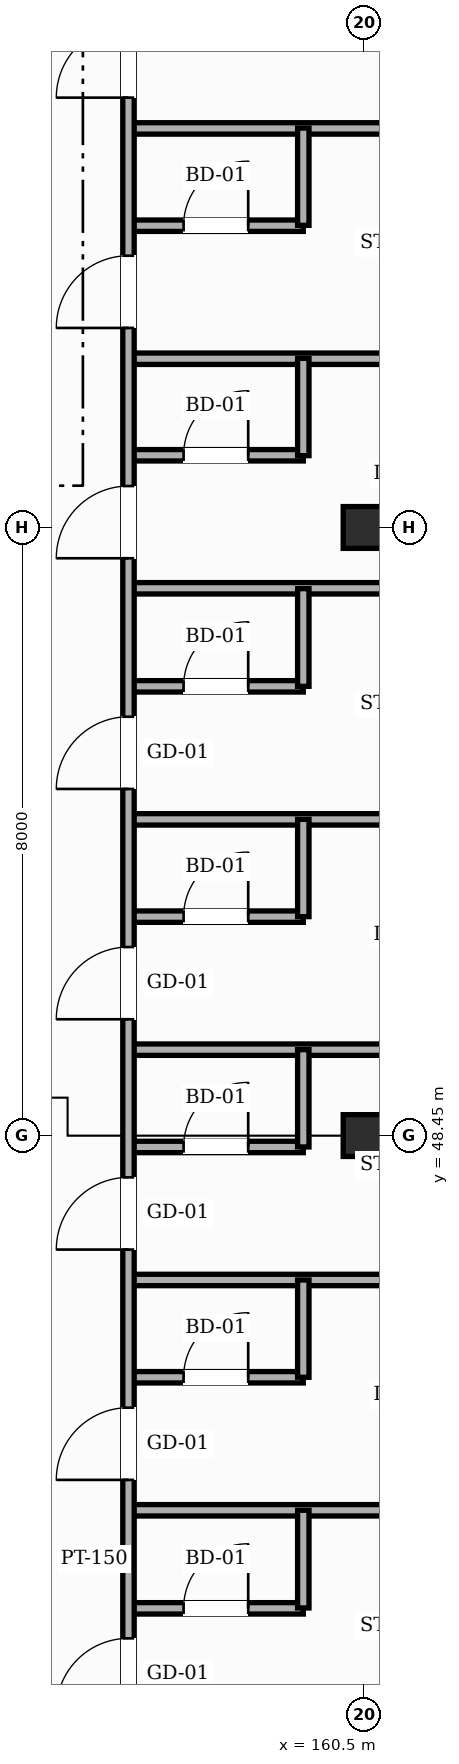
"""IFC4 building model, lengths in metres.
Left out: names, types, materials, properties, quantities, classifications, styles, units other than length and angle.
Written with IfcOpenShell. Run it as: python <this file> out.ifc"""

import sys

from ifc_helpers import new_model, si_unit, direction, frame, frame_2d, origin, origin_2d, place, context, subcontext, project, spatial, rectangle, hollow_rectangle, extrude, element, fill, save


model = new_model("IFC4")
c1 = context("Model", 3, precision=1e-05, world=origin(), true_north=direction((0.0, 1.0)))
c2 = subcontext(c1, "Body", "Model", "MODEL_VIEW")
j1 = project(units=[si_unit("LENGTHUNIT", "METRE"), si_unit("PLANEANGLEUNIT", "RADIAN")], contexts=[c1])
p1 = place(None, origin())
s1 = spatial("IfcSite", under=j1, at=p1, CompositionType="ELEMENT")
p2 = place(p1, origin())
s2 = spatial("IfcBuilding", under=s1, at=p2, CompositionType="ELEMENT")
p3 = place(p2, frame((0.0, 0.0, 24.6)))
s3 = spatial("IfcBuildingStorey", under=s2, at=p3, CompositionType="ELEMENT", Elevation=24.6)
for number, where, z_axis, x_axis in (
    (1, (160.5, 48.45, 0.0), (0.0, 0.0, 1.0), (1.0, 0.0, 0.0)),
    (2, (160.5, 56.45, 0.0), (0.0, 0.0, 1.0), (1.0, 0.0, 0.0)),
):
    element("IfcColumn", number, at=place(p3, frame(where, z_axis=z_axis, x_axis=x_axis)), inside=s3, PredefinedType="COLUMN", context=c2, shape_type="SweptSolid", body=[
        extrude(hollow_rectangle(XDim=0.55, YDim=0.55, WallThickness=0.022, InnerFilletRadius=0.022, OuterFilletRadius=0.044, at=origin_2d()), origin(), (0.0, 0.0, 1.0), 3.6),
    ])
p4 = place(p3, frame((157.4, 42.23, 0.0), z_axis=(0.0, 0.0, 1.0), x_axis=(1.0, 0.0, 0.0)))
e3 = element("IfcWall", 3, at=p4, inside=s3, PredefinedType="PARTITIONING", context=c2, shape_type="SweptSolid", body=[
    extrude(rectangle(XDim=2.3, YDim=0.15, at=frame_2d((1.15, 0.0))), origin(), (0.0, 0.0, 1.0), 3.365),
])
p5 = place(p4, frame((0.725, 0.0, 0.0)))
e4 = element("IfcOpeningElement", 4, at=p5, cuts=e3, PredefinedType="OPENING", context=c2, shape_type="SweptSolid", body=[
    extrude(rectangle(XDim=0.85, YDim=2.1, at=frame_2d((0.425, 1.05))), frame((0.0, 0.085, 0.0), z_axis=(0.0, -1.0, 0.0), x_axis=(1.0, 0.0, 0.0)), (0.0, 0.0, 1.0), 0.17),
])
p6 = place(p3, frame((157.4, 43.52, 0.0), z_axis=(0.0, 0.0, 1.0), x_axis=(1.0, 0.0, 0.0)))
e5 = element("IfcWall", 5, at=p6, inside=s3, PredefinedType="PARTITIONING", context=c2, shape_type="SweptSolid", body=[
    extrude(rectangle(XDim=9.8, YDim=0.15, at=frame_2d((4.9, 0.0))), origin(), (0.0, 0.0, 1.0), 3.365),
])
p7 = place(p3, frame((157.4, 45.27, 0.0), z_axis=(0.0, 0.0, 1.0), x_axis=(1.0, 0.0, 0.0)))
e6 = element("IfcWall", 6, at=p7, inside=s3, PredefinedType="PARTITIONING", context=c2, shape_type="SweptSolid", body=[
    extrude(rectangle(XDim=2.3, YDim=0.15, at=frame_2d((1.15, 0.0))), origin(), (0.0, 0.0, 1.0), 3.365),
])
p8 = place(p7, frame((0.725, 0.0, 0.0)))
e7 = element("IfcOpeningElement", 7, at=p8, cuts=e6, PredefinedType="OPENING", context=c2, shape_type="SweptSolid", body=[
    extrude(rectangle(XDim=0.85, YDim=2.1, at=frame_2d((0.425, 1.05))), frame((0.0, 0.085, 0.0), z_axis=(0.0, -1.0, 0.0), x_axis=(1.0, 0.0, 0.0)), (0.0, 0.0, 1.0), 0.17),
])
p9 = place(p3, frame((157.4, 46.55, 0.0), z_axis=(0.0, 0.0, 1.0), x_axis=(1.0, 0.0, 0.0)))
e8 = element("IfcWall", 8, at=p9, inside=s3, PredefinedType="PARTITIONING", context=c2, shape_type="SweptSolid", body=[
    extrude(rectangle(XDim=9.8, YDim=0.15, at=frame_2d((4.9, 0.0))), origin(), (0.0, 0.0, 1.0), 3.365),
])
p10 = place(p3, frame((157.4, 48.3, 0.0), z_axis=(0.0, 0.0, 1.0), x_axis=(1.0, 0.0, 0.0)))
e9 = element("IfcWall", 9, at=p10, inside=s3, PredefinedType="PARTITIONING", context=c2, shape_type="SweptSolid", body=[
    extrude(rectangle(XDim=2.3, YDim=0.15, at=frame_2d((1.15, 0.0))), origin(), (0.0, 0.0, 1.0), 3.365),
])
p11 = place(p10, frame((0.725, 0.0, 0.0)))
e10 = element("IfcOpeningElement", 10, at=p11, cuts=e9, PredefinedType="OPENING", context=c2, shape_type="SweptSolid", body=[
    extrude(rectangle(XDim=0.85, YDim=2.1, at=frame_2d((0.425, 1.05))), frame((0.0, 0.085, 0.0), z_axis=(0.0, -1.0, 0.0), x_axis=(1.0, 0.0, 0.0)), (0.0, 0.0, 1.0), 0.17),
])
p12 = place(p3, frame((157.4, 49.58, 0.0), z_axis=(0.0, 0.0, 1.0), x_axis=(1.0, 0.0, 0.0)))
e11 = element("IfcWall", 11, at=p12, inside=s3, PredefinedType="PARTITIONING", context=c2, shape_type="SweptSolid", body=[
    extrude(rectangle(XDim=9.8, YDim=0.15, at=frame_2d((4.9, 0.0))), origin(), (0.0, 0.0, 1.0), 3.365),
])
p13 = place(p3, frame((157.4, 51.33, 0.0), z_axis=(0.0, 0.0, 1.0), x_axis=(1.0, 0.0, 0.0)))
e12 = element("IfcWall", 12, at=p13, inside=s3, PredefinedType="PARTITIONING", context=c2, shape_type="SweptSolid", body=[
    extrude(rectangle(XDim=2.3, YDim=0.15, at=frame_2d((1.15, 0.0))), origin(), (0.0, 0.0, 1.0), 3.365),
])
p14 = place(p13, frame((0.725, 0.0, 0.0)))
e13 = element("IfcOpeningElement", 13, at=p14, cuts=e12, PredefinedType="OPENING", context=c2, shape_type="SweptSolid", body=[
    extrude(rectangle(XDim=0.85, YDim=2.1, at=frame_2d((0.425, 1.05))), frame((0.0, 0.085, 0.0), z_axis=(0.0, -1.0, 0.0), x_axis=(1.0, 0.0, 0.0)), (0.0, 0.0, 1.0), 0.17),
])
p15 = place(p3, frame((157.4, 52.61, 0.0), z_axis=(0.0, 0.0, 1.0), x_axis=(1.0, 0.0, 0.0)))
e14 = element("IfcWall", 14, at=p15, inside=s3, PredefinedType="PARTITIONING", context=c2, shape_type="SweptSolid", body=[
    extrude(rectangle(XDim=9.8, YDim=0.15, at=frame_2d((4.9, 0.0))), origin(), (0.0, 0.0, 1.0), 3.055),
])
p16 = place(p3, frame((157.4, 54.36, 0.0), z_axis=(0.0, 0.0, 1.0), x_axis=(1.0, 0.0, 0.0)))
e15 = element("IfcWall", 15, at=p16, inside=s3, PredefinedType="PARTITIONING", context=c2, shape_type="SweptSolid", body=[
    extrude(rectangle(XDim=2.3, YDim=0.15, at=frame_2d((1.15, 0.0))), origin(), (0.0, 0.0, 1.0), 3.365),
])
p17 = place(p16, frame((0.725, 0.0, 0.0)))
e16 = element("IfcOpeningElement", 16, at=p17, cuts=e15, PredefinedType="OPENING", context=c2, shape_type="SweptSolid", body=[
    extrude(rectangle(XDim=0.85, YDim=2.1, at=frame_2d((0.425, 1.05))), frame((0.0, 0.085, 0.0), z_axis=(0.0, -1.0, 0.0), x_axis=(1.0, 0.0, 0.0)), (0.0, 0.0, 1.0), 0.17),
])
p18 = place(p3, frame((157.4, 55.65, 0.0), z_axis=(0.0, 0.0, 1.0), x_axis=(1.0, 0.0, 0.0)))
e17 = element("IfcWall", 17, at=p18, inside=s3, PredefinedType="PARTITIONING", context=c2, shape_type="SweptSolid", body=[
    extrude(rectangle(XDim=9.8, YDim=0.15, at=frame_2d((4.9, 0.0))), origin(), (0.0, 0.0, 1.0), 3.365),
])
p19 = place(p3, frame((157.4, 57.4, 0.0), z_axis=(0.0, 0.0, 1.0), x_axis=(1.0, 0.0, 0.0)))
e18 = element("IfcWall", 18, at=p19, inside=s3, PredefinedType="PARTITIONING", context=c2, shape_type="SweptSolid", body=[
    extrude(rectangle(XDim=2.3, YDim=0.15, at=frame_2d((1.15, 0.0))), origin(), (0.0, 0.0, 1.0), 3.365),
])
p20 = place(p19, frame((0.725, 0.0, 0.0)))
e19 = element("IfcOpeningElement", 19, at=p20, cuts=e18, PredefinedType="OPENING", context=c2, shape_type="SweptSolid", body=[
    extrude(rectangle(XDim=0.85, YDim=2.1, at=frame_2d((0.425, 1.05))), frame((0.0, 0.085, 0.0), z_axis=(0.0, -1.0, 0.0), x_axis=(1.0, 0.0, 0.0)), (0.0, 0.0, 1.0), 0.17),
])
p21 = place(p3, frame((157.4, 58.67, 0.0), z_axis=(0.0, 0.0, 1.0), x_axis=(1.0, 0.0, 0.0)))
e20 = element("IfcWall", 20, at=p21, inside=s3, PredefinedType="PARTITIONING", context=c2, shape_type="SweptSolid", body=[
    extrude(rectangle(XDim=9.8, YDim=0.15, at=frame_2d((4.9, 0.0))), origin(), (0.0, 0.0, 1.0), 3.365),
])
p22 = place(p3, frame((157.4, 60.42, 0.0), z_axis=(0.0, 0.0, 1.0), x_axis=(1.0, 0.0, 0.0)))
e21 = element("IfcWall", 21, at=p22, inside=s3, PredefinedType="PARTITIONING", context=c2, shape_type="SweptSolid", body=[
    extrude(rectangle(XDim=2.3, YDim=0.15, at=frame_2d((1.15, 0.0))), origin(), (0.0, 0.0, 1.0), 3.365),
])
p23 = place(p22, frame((0.725, 0.0, 0.0)))
e22 = element("IfcOpeningElement", 22, at=p23, cuts=e21, PredefinedType="OPENING", context=c2, shape_type="SweptSolid", body=[
    extrude(rectangle(XDim=0.85, YDim=2.1, at=frame_2d((0.425, 1.05))), frame((0.0, 0.085, 0.0), z_axis=(0.0, -1.0, 0.0), x_axis=(1.0, 0.0, 0.0)), (0.0, 0.0, 1.0), 0.17),
])
p24 = place(p3, frame((157.4, 61.7, 0.0), z_axis=(0.0, 0.0, 1.0), x_axis=(1.0, 0.0, 0.0)))
e23 = element("IfcWall", 23, at=p24, inside=s3, PredefinedType="PARTITIONING", context=c2, shape_type="SweptSolid", body=[
    extrude(rectangle(XDim=9.8, YDim=0.15, at=frame_2d((4.9, 0.0))), origin(), (0.0, 0.0, 1.0), 3.365),
])
p25 = place(p3, frame((157.4, 22.3, 0.0), z_axis=(0.0, 0.0, 1.0), x_axis=(0.0, 1.0, 0.0)))
e24 = element("IfcWall", 24, at=p25, inside=s3, PredefinedType="PARTITIONING", context=c2, shape_type="SweptSolid", body=[
    extrude(rectangle(XDim=48.5, YDim=0.15, at=frame_2d((24.25, 0.0))), origin(), (0.0, 0.0, 1.0), 3.365),
])
p26 = place(p25, frame((0.4, 0.0, 0.0)))
e25 = element("IfcOpeningElement", 25, at=p26, cuts=e24, PredefinedType="OPENING", context=c2, shape_type="SweptSolid", body=[
    extrude(rectangle(XDim=0.95, YDim=2.15, at=frame_2d((0.475, 1.075))), frame((0.0, 0.085, 0.0), z_axis=(0.0, -1.0, 0.0), x_axis=(1.0, 0.0, 0.0)), (0.0, 0.0, 1.0), 0.17),
])
p27 = place(p25, frame((3.43, 0.0, 0.0)))
e26 = element("IfcOpeningElement", 26, at=p27, cuts=e24, PredefinedType="OPENING", context=c2, shape_type="SweptSolid", body=[
    extrude(rectangle(XDim=0.95, YDim=2.15, at=frame_2d((0.475, 1.075))), frame((0.0, 0.085, 0.0), z_axis=(0.0, -1.0, 0.0), x_axis=(1.0, 0.0, 0.0)), (0.0, 0.0, 1.0), 0.17),
])
p28 = place(p25, frame((6.46, 0.0, 0.0)))
e27 = element("IfcOpeningElement", 27, at=p28, cuts=e24, PredefinedType="OPENING", context=c2, shape_type="SweptSolid", body=[
    extrude(rectangle(XDim=0.95, YDim=2.15, at=frame_2d((0.475, 1.075))), frame((0.0, 0.085, 0.0), z_axis=(0.0, -1.0, 0.0), x_axis=(1.0, 0.0, 0.0)), (0.0, 0.0, 1.0), 0.17),
])
p29 = place(p25, frame((9.495, 0.0, 0.0)))
e28 = element("IfcOpeningElement", 28, at=p29, cuts=e24, PredefinedType="OPENING", context=c2, shape_type="SweptSolid", body=[
    extrude(rectangle(XDim=0.95, YDim=2.15, at=frame_2d((0.475, 1.075))), frame((0.0, 0.085, 0.0), z_axis=(0.0, -1.0, 0.0), x_axis=(1.0, 0.0, 0.0)), (0.0, 0.0, 1.0), 0.17),
])
p30 = place(p25, frame((12.525, 0.0, 0.0)))
e29 = element("IfcOpeningElement", 29, at=p30, cuts=e24, PredefinedType="OPENING", context=c2, shape_type="SweptSolid", body=[
    extrude(rectangle(XDim=0.95, YDim=2.15, at=frame_2d((0.475, 1.075))), frame((0.0, 0.085, 0.0), z_axis=(0.0, -1.0, 0.0), x_axis=(1.0, 0.0, 0.0)), (0.0, 0.0, 1.0), 0.17),
])
p31 = place(p25, frame((15.555, 0.0, 0.0)))
e30 = element("IfcOpeningElement", 30, at=p31, cuts=e24, PredefinedType="OPENING", context=c2, shape_type="SweptSolid", body=[
    extrude(rectangle(XDim=0.95, YDim=2.15, at=frame_2d((0.475, 1.075))), frame((0.0, 0.085, 0.0), z_axis=(0.0, -1.0, 0.0), x_axis=(1.0, 0.0, 0.0)), (0.0, 0.0, 1.0), 0.17),
])
p32 = place(p25, frame((18.585, 0.0, 0.0)))
e31 = element("IfcOpeningElement", 31, at=p32, cuts=e24, PredefinedType="OPENING", context=c2, shape_type="SweptSolid", body=[
    extrude(rectangle(XDim=0.95, YDim=2.15, at=frame_2d((0.475, 1.075))), frame((0.0, 0.085, 0.0), z_axis=(0.0, -1.0, 0.0), x_axis=(1.0, 0.0, 0.0)), (0.0, 0.0, 1.0), 0.17),
])
p33 = place(p25, frame((21.62, 0.0, 0.0)))
e32 = element("IfcOpeningElement", 32, at=p33, cuts=e24, PredefinedType="OPENING", context=c2, shape_type="SweptSolid", body=[
    extrude(rectangle(XDim=0.95, YDim=2.15, at=frame_2d((0.475, 1.075))), frame((0.0, 0.085, 0.0), z_axis=(0.0, -1.0, 0.0), x_axis=(1.0, 0.0, 0.0)), (0.0, 0.0, 1.0), 0.17),
])
p34 = place(p25, frame((24.65, 0.0, 0.0)))
e33 = element("IfcOpeningElement", 33, at=p34, cuts=e24, PredefinedType="OPENING", context=c2, shape_type="SweptSolid", body=[
    extrude(rectangle(XDim=0.95, YDim=2.15, at=frame_2d((0.475, 1.075))), frame((0.0, 0.085, 0.0), z_axis=(0.0, -1.0, 0.0), x_axis=(1.0, 0.0, 0.0)), (0.0, 0.0, 1.0), 0.17),
])
p35 = place(p25, frame((27.68, 0.0, 0.0)))
e34 = element("IfcOpeningElement", 34, at=p35, cuts=e24, PredefinedType="OPENING", context=c2, shape_type="SweptSolid", body=[
    extrude(rectangle(XDim=0.95, YDim=2.15, at=frame_2d((0.475, 1.075))), frame((0.0, 0.085, 0.0), z_axis=(0.0, -1.0, 0.0), x_axis=(1.0, 0.0, 0.0)), (0.0, 0.0, 1.0), 0.17),
])
p36 = place(p25, frame((30.71, 0.0, 0.0)))
e35 = element("IfcOpeningElement", 35, at=p36, cuts=e24, PredefinedType="OPENING", context=c2, shape_type="SweptSolid", body=[
    extrude(rectangle(XDim=0.95, YDim=2.15, at=frame_2d((0.475, 1.075))), frame((0.0, 0.085, 0.0), z_axis=(0.0, -1.0, 0.0), x_axis=(1.0, 0.0, 0.0)), (0.0, 0.0, 1.0), 0.17),
])
p37 = place(p25, frame((33.745, 0.0, 0.0)))
e36 = element("IfcOpeningElement", 36, at=p37, cuts=e24, PredefinedType="OPENING", context=c2, shape_type="SweptSolid", body=[
    extrude(rectangle(XDim=0.95, YDim=2.15, at=frame_2d((0.475, 1.075))), frame((0.0, 0.085, 0.0), z_axis=(0.0, -1.0, 0.0), x_axis=(1.0, 0.0, 0.0)), (0.0, 0.0, 1.0), 0.17),
])
p38 = place(p25, frame((36.775, 0.0, 0.0)))
e37 = element("IfcOpeningElement", 37, at=p38, cuts=e24, PredefinedType="OPENING", context=c2, shape_type="SweptSolid", body=[
    extrude(rectangle(XDim=0.95, YDim=2.15, at=frame_2d((0.475, 1.075))), frame((0.0, 0.085, 0.0), z_axis=(0.0, -1.0, 0.0), x_axis=(1.0, 0.0, 0.0)), (0.0, 0.0, 1.0), 0.17),
])
p39 = place(p25, frame((39.805, 0.0, 0.0)))
e38 = element("IfcOpeningElement", 38, at=p39, cuts=e24, PredefinedType="OPENING", context=c2, shape_type="SweptSolid", body=[
    extrude(rectangle(XDim=0.95, YDim=2.15, at=frame_2d((0.475, 1.075))), frame((0.0, 0.085, 0.0), z_axis=(0.0, -1.0, 0.0), x_axis=(1.0, 0.0, 0.0)), (0.0, 0.0, 1.0), 0.17),
])
p40 = place(p25, frame((42.84, 0.0, 0.0)))
e39 = element("IfcOpeningElement", 39, at=p40, cuts=e24, PredefinedType="OPENING", context=c2, shape_type="SweptSolid", body=[
    extrude(rectangle(XDim=0.95, YDim=2.15, at=frame_2d((0.475, 1.075))), frame((0.0, 0.085, 0.0), z_axis=(0.0, -1.0, 0.0), x_axis=(1.0, 0.0, 0.0)), (0.0, 0.0, 1.0), 0.17),
])
p41 = place(p25, frame((45.87, 0.0, 0.0)))
e40 = element("IfcOpeningElement", 40, at=p41, cuts=e24, PredefinedType="OPENING", context=c2, shape_type="SweptSolid", body=[
    extrude(rectangle(XDim=0.95, YDim=2.15, at=frame_2d((0.475, 1.075))), frame((0.0, 0.085, 0.0), z_axis=(0.0, -1.0, 0.0), x_axis=(1.0, 0.0, 0.0)), (0.0, 0.0, 1.0), 0.17),
])
p42 = place(p3, frame((159.7, 42.235, 0.0), z_axis=(0.0, 0.0, 1.0), x_axis=(0.0, 1.0, 0.0)))
e41 = element("IfcWall", 41, at=p42, inside=s3, PredefinedType="PARTITIONING", context=c2, shape_type="SweptSolid", body=[
    extrude(rectangle(XDim=1.285, YDim=0.15, at=frame_2d((0.643, 0.0))), origin(), (0.0, 0.0, 1.0), 3.365),
])
for number, where, z_axis, x_axis in (
    (42, (159.7, 45.27, 0.0), (0.0, 0.0, 1.0), (0.0, 1.0, 0.0)),
    (43, (159.7, 48.3, 0.0), (0.0, 0.0, 1.0), (0.0, 1.0, 0.0)),
    (44, (159.7, 51.33, 0.0), (0.0, 0.0, 1.0), (0.0, 1.0, 0.0)),
):
    element("IfcWall", number, at=place(p3, frame(where, z_axis=z_axis, x_axis=x_axis)), inside=s3, PredefinedType="PARTITIONING", context=c2, shape_type="SweptSolid", body=[
        extrude(rectangle(XDim=1.28, YDim=0.15, at=frame_2d((0.64, 0.0))), origin(), (0.0, 0.0, 1.0), 3.365),
    ])
p43 = place(p3, frame((159.7, 54.36, 0.0), z_axis=(0.0, 0.0, 1.0), x_axis=(0.0, 1.0, 0.0)))
e45 = element("IfcWall", 45, at=p43, inside=s3, PredefinedType="PARTITIONING", context=c2, shape_type="SweptSolid", body=[
    extrude(rectangle(XDim=1.285, YDim=0.15, at=frame_2d((0.643, 0.0))), origin(), (0.0, 0.0, 1.0), 3.365),
])
for number, where, z_axis, x_axis in (
    (46, (159.7, 57.395, 0.0), (0.0, 0.0, 1.0), (0.0, 1.0, 0.0)),
    (47, (159.7, 60.425, 0.0), (0.0, 0.0, 1.0), (0.0, 1.0, 0.0)),
):
    element("IfcWall", number, at=place(p3, frame(where, z_axis=z_axis, x_axis=x_axis)), inside=s3, PredefinedType="PARTITIONING", context=c2, shape_type="SweptSolid", body=[
        extrude(rectangle(XDim=1.28, YDim=0.15, at=frame_2d((0.64, 0.0))), origin(), (0.0, 0.0, 1.0), 3.365),
    ])
p44 = place(p32, origin())
e48 = element("IfcDoor", 48, at=p44, inside=s3, OperationType="SINGLE_SWING_LEFT", PredefinedType="DOOR", context=c2, shape_type="SweptSolid", body=[
    extrude(rectangle(XDim=0.95, YDim=2.15, at=frame_2d((0.475, 1.075))), frame((0.0, 0.025, 0.0), z_axis=(0.0, -1.0, 0.0), x_axis=(1.0, 0.0, 0.0)), (0.0, 0.0, 1.0), 0.05),
])
fill(e31, e48)
p45 = place(p5, origin())
e49 = element("IfcDoor", 49, at=p45, inside=s3, OperationType="SINGLE_SWING_RIGHT", PredefinedType="DOOR", context=c2, shape_type="SweptSolid", body=[
    extrude(rectangle(XDim=0.85, YDim=2.1, at=frame_2d((0.425, 1.05))), frame((0.0, 0.025, 0.0), z_axis=(0.0, -1.0, 0.0), x_axis=(1.0, 0.0, 0.0)), (0.0, 0.0, 1.0), 0.05),
])
fill(e4, e49)
p46 = place(p33, origin())
e50 = element("IfcDoor", 50, at=p46, inside=s3, OperationType="SINGLE_SWING_LEFT", PredefinedType="DOOR", context=c2, shape_type="SweptSolid", body=[
    extrude(rectangle(XDim=0.95, YDim=2.15, at=frame_2d((0.475, 1.075))), frame((0.0, 0.025, 0.0), z_axis=(0.0, -1.0, 0.0), x_axis=(1.0, 0.0, 0.0)), (0.0, 0.0, 1.0), 0.05),
])
fill(e32, e50)
p47 = place(p8, origin())
e51 = element("IfcDoor", 51, at=p47, inside=s3, OperationType="SINGLE_SWING_RIGHT", PredefinedType="DOOR", context=c2, shape_type="SweptSolid", body=[
    extrude(rectangle(XDim=0.85, YDim=2.1, at=frame_2d((0.425, 1.05))), frame((0.0, 0.025, 0.0), z_axis=(0.0, -1.0, 0.0), x_axis=(1.0, 0.0, 0.0)), (0.0, 0.0, 1.0), 0.05),
])
fill(e7, e51)
p48 = place(p34, origin())
e52 = element("IfcDoor", 52, at=p48, inside=s3, OperationType="SINGLE_SWING_LEFT", PredefinedType="DOOR", context=c2, shape_type="SweptSolid", body=[
    extrude(rectangle(XDim=0.95, YDim=2.15, at=frame_2d((0.475, 1.075))), frame((0.0, 0.025, 0.0), z_axis=(0.0, -1.0, 0.0), x_axis=(1.0, 0.0, 0.0)), (0.0, 0.0, 1.0), 0.05),
])
fill(e33, e52)
p49 = place(p11, origin())
e53 = element("IfcDoor", 53, at=p49, inside=s3, OperationType="SINGLE_SWING_RIGHT", PredefinedType="DOOR", context=c2, shape_type="SweptSolid", body=[
    extrude(rectangle(XDim=0.85, YDim=2.1, at=frame_2d((0.425, 1.05))), frame((0.0, 0.025, 0.0), z_axis=(0.0, -1.0, 0.0), x_axis=(1.0, 0.0, 0.0)), (0.0, 0.0, 1.0), 0.05),
])
fill(e10, e53)
p50 = place(p35, origin())
e54 = element("IfcDoor", 54, at=p50, inside=s3, OperationType="SINGLE_SWING_LEFT", PredefinedType="DOOR", context=c2, shape_type="SweptSolid", body=[
    extrude(rectangle(XDim=0.95, YDim=2.15, at=frame_2d((0.475, 1.075))), frame((0.0, 0.025, 0.0), z_axis=(0.0, -1.0, 0.0), x_axis=(1.0, 0.0, 0.0)), (0.0, 0.0, 1.0), 0.05),
])
fill(e34, e54)
p51 = place(p14, origin())
e55 = element("IfcDoor", 55, at=p51, inside=s3, OperationType="SINGLE_SWING_RIGHT", PredefinedType="DOOR", context=c2, shape_type="SweptSolid", body=[
    extrude(rectangle(XDim=0.85, YDim=2.1, at=frame_2d((0.425, 1.05))), frame((0.0, 0.025, 0.0), z_axis=(0.0, -1.0, 0.0), x_axis=(1.0, 0.0, 0.0)), (0.0, 0.0, 1.0), 0.05),
])
fill(e13, e55)
p52 = place(p36, origin())
e56 = element("IfcDoor", 56, at=p52, inside=s3, OperationType="SINGLE_SWING_LEFT", PredefinedType="DOOR", context=c2, shape_type="SweptSolid", body=[
    extrude(rectangle(XDim=0.95, YDim=2.15, at=frame_2d((0.475, 1.075))), frame((0.0, 0.025, 0.0), z_axis=(0.0, -1.0, 0.0), x_axis=(1.0, 0.0, 0.0)), (0.0, 0.0, 1.0), 0.05),
])
fill(e35, e56)
p53 = place(p17, origin())
e57 = element("IfcDoor", 57, at=p53, inside=s3, OperationType="SINGLE_SWING_RIGHT", PredefinedType="DOOR", context=c2, shape_type="SweptSolid", body=[
    extrude(rectangle(XDim=0.85, YDim=2.1, at=frame_2d((0.425, 1.05))), frame((0.0, 0.025, 0.0), z_axis=(0.0, -1.0, 0.0), x_axis=(1.0, 0.0, 0.0)), (0.0, 0.0, 1.0), 0.05),
])
fill(e16, e57)
p54 = place(p37, origin())
e58 = element("IfcDoor", 58, at=p54, inside=s3, OperationType="SINGLE_SWING_LEFT", PredefinedType="DOOR", context=c2, shape_type="SweptSolid", body=[
    extrude(rectangle(XDim=0.95, YDim=2.15, at=frame_2d((0.475, 1.075))), frame((0.0, 0.025, 0.0), z_axis=(0.0, -1.0, 0.0), x_axis=(1.0, 0.0, 0.0)), (0.0, 0.0, 1.0), 0.05),
])
fill(e36, e58)
p55 = place(p20, origin())
e59 = element("IfcDoor", 59, at=p55, inside=s3, OperationType="SINGLE_SWING_RIGHT", PredefinedType="DOOR", context=c2, shape_type="SweptSolid", body=[
    extrude(rectangle(XDim=0.85, YDim=2.1, at=frame_2d((0.425, 1.05))), frame((0.0, 0.025, 0.0), z_axis=(0.0, -1.0, 0.0), x_axis=(1.0, 0.0, 0.0)), (0.0, 0.0, 1.0), 0.05),
])
fill(e19, e59)
p56 = place(p38, origin())
e60 = element("IfcDoor", 60, at=p56, inside=s3, OperationType="SINGLE_SWING_LEFT", PredefinedType="DOOR", context=c2, shape_type="SweptSolid", body=[
    extrude(rectangle(XDim=0.95, YDim=2.15, at=frame_2d((0.475, 1.075))), frame((0.0, 0.025, 0.0), z_axis=(0.0, -1.0, 0.0), x_axis=(1.0, 0.0, 0.0)), (0.0, 0.0, 1.0), 0.05),
])
fill(e37, e60)
p57 = place(p23, origin())
e61 = element("IfcDoor", 61, at=p57, inside=s3, OperationType="SINGLE_SWING_RIGHT", PredefinedType="DOOR", context=c2, shape_type="SweptSolid", body=[
    extrude(rectangle(XDim=0.85, YDim=2.1, at=frame_2d((0.425, 1.05))), frame((0.0, 0.025, 0.0), z_axis=(0.0, -1.0, 0.0), x_axis=(1.0, 0.0, 0.0)), (0.0, 0.0, 1.0), 0.05),
])
fill(e22, e61)
p58 = place(p39, origin())
e62 = element("IfcDoor", 62, at=p58, inside=s3, OperationType="SINGLE_SWING_LEFT", PredefinedType="DOOR", context=c2, shape_type="SweptSolid", body=[
    extrude(rectangle(XDim=0.95, YDim=2.15, at=frame_2d((0.475, 1.075))), frame((0.0, 0.025, 0.0), z_axis=(0.0, -1.0, 0.0), x_axis=(1.0, 0.0, 0.0)), (0.0, 0.0, 1.0), 0.05),
])
fill(e38, e62)
save(model, sys.argv[1])
